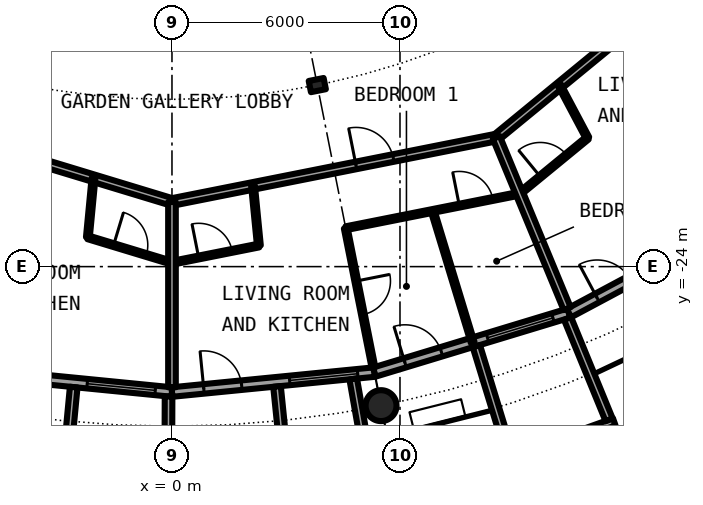
"""IFC4 building model, lengths in metres.
Left out: names, types, materials, properties, quantities, classifications, styles, units other than length and angle.
Written with IfcOpenShell. Run it as: python <this file> out.ifc"""

import sys

from ifc_helpers import new_model, si_unit, direction, frame, frame_2d, origin, origin_2d, place, context, subcontext, project, spatial, rectangle, circle, hollow_circle, i_section, extrude, element, fill, save


model = new_model("IFC4")
c1 = context("Model", 3, precision=1e-05, world=origin(), true_north=direction((0.0, 1.0)))
c2 = subcontext(c1, "Body", "Model", "MODEL_VIEW")
j1 = project(units=[si_unit("LENGTHUNIT", "METRE"), si_unit("PLANEANGLEUNIT", "RADIAN")], contexts=[c1])
p1 = place(None, origin())
s1 = spatial("IfcSite", under=j1, at=p1, CompositionType="ELEMENT")
p2 = place(p1, origin())
s2 = spatial("IfcBuilding", under=s1, at=p2, CompositionType="ELEMENT")
p3 = place(p2, frame((0.0, 0.0, 196.3)))
s3 = spatial("IfcBuildingStorey", under=s2, at=p3, CompositionType="ELEMENT", Elevation=196.3)
p4 = place(p3, frame((5.501, -27.658, 0.0), z_axis=(0.0, 0.0, 1.0), x_axis=(1.0, 0.0, 0.0)))
e1 = element("IfcColumn", 1, at=p4, inside=s3, PredefinedType="COLUMN", context=c2, shape_type="SweptSolid", body=[
    extrude(hollow_circle(Radius=0.406, WallThickness=0.03, at=origin_2d()), origin(), (0.0, 0.0, 1.0), 3.05),
])
p5 = place(p3, frame((3.824, -19.223, 0.0), z_axis=(0.0, 0.0, 1.0), x_axis=(0.195090322016, -0.980785280403, 0.0)))
e2 = element("IfcColumn", 2, at=p5, inside=s3, PredefinedType="COLUMN", context=c2, shape_type="SweptSolid", body=[
    extrude(i_section(OverallWidth=0.3, OverallDepth=0.4, WebThickness=0.013, FlangeThickness=0.024, FilletRadius=0.027, at=origin_2d()), origin(), (0.0, 0.0, 1.0), 3.05),
])
p6 = place(p3, frame((-5.326, -26.775, 0.0), z_axis=(0.0, 0.0, 1.0), x_axis=(0.995173996315, -0.098126026407, 0.0)))
e3 = element("IfcWall", 3, at=p6, inside=s3, PredefinedType="SOLIDWALL", context=c2, shape_type="SweptSolid", body=[
    extrude(rectangle(XDim=5.352, YDim=0.25, at=frame_2d((2.676, 0.0))), origin(), (0.0, 0.0, 1.0), 2.7),
])
p7 = place(p6, frame((0.841, 0.0, 0.0)))
e4 = element("IfcOpeningElement", 4, at=p7, cuts=e3, PredefinedType="OPENING", context=c2, shape_type="SweptSolid", body=[
    extrude(rectangle(XDim=1.0, YDim=2.2, at=frame_2d((0.5, 1.1))), frame((0.0, 0.135, 0.0), z_axis=(0.0, -1.0, 0.0), x_axis=(1.0, 0.0, 0.0)), (0.0, 0.0, 1.0), 0.27),
])
p8 = place(p6, frame((3.111, 0.0, 0.3)))
e5 = element("IfcOpeningElement", 5, at=p8, cuts=e3, PredefinedType="OPENING", context=c2, shape_type="SweptSolid", body=[
    extrude(rectangle(XDim=1.8, YDim=2.1, at=frame_2d((0.9, 1.05))), frame((0.0, 0.135, 0.0), z_axis=(0.0, -1.0, 0.0), x_axis=(1.0, 0.0, 0.0)), (0.0, 0.0, 1.0), 0.27),
])
p9 = place(p3, frame((-2.586, -27.171, -0.03), z_axis=(0.0, 0.0, 1.0), x_axis=(-0.094548432284, -0.995520262954, 0.0)))
e6 = element("IfcWall", 6, at=p9, inside=s3, PredefinedType="SOLIDWALL", context=c2, shape_type="SweptSolid", body=[
    extrude(rectangle(XDim=3.006, YDim=0.2, at=frame_2d((1.503, 0.0))), origin(), (0.0, 0.0, 1.0), 2.73),
])
p10 = place(p3, frame((-0.09, -27.417, -0.03), z_axis=(0.0, 0.0, 1.0), x_axis=(-0.00347308367, -0.999993968827, 0.0)))
e7 = element("IfcWall", 7, at=p10, inside=s3, PredefinedType="SOLIDWALL", context=c2, shape_type="SweptSolid", body=[
    extrude(rectangle(XDim=2.882, YDim=0.2, at=frame_2d((1.441, 0.0))), origin(), (0.0, 0.0, 1.0), 2.73),
])
p11 = place(p3, frame((0.0, -27.3, 0.0), z_axis=(0.0, 0.0, 1.0), x_axis=(0.995173996315, 0.098126026407, 0.0)))
e8 = element("IfcWall", 8, at=p11, inside=s3, PredefinedType="SOLIDWALL", context=c2, shape_type="SweptSolid", body=[
    extrude(rectangle(XDim=5.352, YDim=0.25, at=frame_2d((2.676, 0.0))), origin(), (0.0, 0.0, 1.0), 2.7),
])
p12 = place(p11, frame((0.841, 0.0, 0.0)))
e9 = element("IfcOpeningElement", 9, at=p12, cuts=e8, PredefinedType="OPENING", context=c2, shape_type="SweptSolid", body=[
    extrude(rectangle(XDim=1.0, YDim=2.2, at=frame_2d((0.5, 1.1))), frame((0.0, 0.135, 0.0), z_axis=(0.0, -1.0, 0.0), x_axis=(1.0, 0.0, 0.0)), (0.0, 0.0, 1.0), 0.27),
])
p13 = place(p11, frame((3.111, 0.0, 0.3)))
e10 = element("IfcOpeningElement", 10, at=p13, cuts=e8, PredefinedType="OPENING", context=c2, shape_type="SweptSolid", body=[
    extrude(rectangle(XDim=1.8, YDim=2.1, at=frame_2d((0.9, 1.05))), frame((0.0, 0.135, 0.0), z_axis=(0.0, -1.0, 0.0), x_axis=(1.0, 0.0, 0.0)), (0.0, 0.0, 1.0), 0.27),
])
p14 = place(p3, frame((2.764, -27.153, -0.03), z_axis=(0.0, 0.0, 1.0), x_axis=(0.101505487237, -0.994834979311, 0.0)))
e11 = element("IfcWall", 11, at=p14, inside=s3, PredefinedType="SOLIDWALL", context=c2, shape_type="SweptSolid", body=[
    extrude(rectangle(XDim=3.007, YDim=0.2, at=frame_2d((1.503, 0.0))), origin(), (0.0, 0.0, 1.0), 2.73),
])
p15 = place(p3, frame((4.769, -26.956, -0.03), z_axis=(0.0, 0.0, 1.0), x_axis=(0.174056778901, -0.984735618183, 0.0)))
e12 = element("IfcWall", 12, at=p15, inside=s3, PredefinedType="SOLIDWALL", context=c2, shape_type="SweptSolid", body=[
    extrude(rectangle(XDim=2.925, YDim=0.2, at=frame_2d((1.462, 0.0))), origin(), (0.0, 0.0, 1.0), 2.73),
])
p16 = place(p3, frame((5.326, -26.775, 0.0), z_axis=(0.0, 0.0, 1.0), x_axis=(0.956965678721, 0.290201119486, 0.0)))
e13 = element("IfcWall", 13, at=p16, inside=s3, PredefinedType="SOLIDWALL", context=c2, shape_type="SweptSolid", body=[
    extrude(rectangle(XDim=5.351, YDim=0.25, at=frame_2d((2.676, 0.0))), origin(), (0.0, 0.0, 1.0), 2.7),
])
p17 = place(p16, frame((0.841, 0.0, 0.0)))
e14 = element("IfcOpeningElement", 14, at=p17, cuts=e13, PredefinedType="OPENING", context=c2, shape_type="SweptSolid", body=[
    extrude(rectangle(XDim=1.0, YDim=2.2, at=frame_2d((0.5, 1.1))), frame((0.0, 0.135, 0.0), z_axis=(0.0, -1.0, 0.0), x_axis=(1.0, 0.0, 0.0)), (0.0, 0.0, 1.0), 0.27),
])
p18 = place(p16, frame((3.111, 0.0, 0.3)))
e15 = element("IfcOpeningElement", 15, at=p18, cuts=e13, PredefinedType="OPENING", context=c2, shape_type="SweptSolid", body=[
    extrude(rectangle(XDim=1.8, YDim=2.1, at=frame_2d((0.9, 1.05))), frame((0.0, 0.135, 0.0), z_axis=(0.0, -1.0, 0.0), x_axis=(1.0, 0.0, 0.0)), (0.0, 0.0, 1.0), 0.27),
])
p19 = place(p3, frame((8.82, -29.093, -0.03), z_axis=(0.0, 0.0, 1.0), x_axis=(0.941461077774, 0.337121697664, 0.0)))
e16 = element("IfcWall", 16, at=p19, inside=s3, PredefinedType="SOLIDWALL", context=c2, shape_type="SweptSolid", body=[
    extrude(rectangle(XDim=2.993, YDim=0.2, at=frame_2d((1.497, 0.0))), origin(), (0.0, 0.0, 1.0), 2.73),
])
p20 = place(p19, frame((0.457, 0.0, 0.33)))
e17 = element("IfcOpeningElement", 17, at=p20, cuts=e16, PredefinedType="OPENING", context=c2, shape_type="SweptSolid", body=[
    extrude(circle(Radius=1.04, at=frame_2d((1.04, 1.04))), frame((0.0, 0.11, 0.0), z_axis=(0.0, -1.0, 0.0), x_axis=(1.0, 0.0, 0.0)), (0.0, 0.0, 1.0), 0.22),
])
p21 = place(p3, frame((8.009, -26.092, -0.03), z_axis=(0.0, 0.0, 1.0), x_axis=(0.293406695073, -0.955987715029, 0.0)))
e18 = element("IfcWall", 18, at=p21, inside=s3, PredefinedType="SOLIDWALL", context=c2, shape_type="SweptSolid", body=[
    extrude(rectangle(XDim=3.006, YDim=0.2, at=frame_2d((1.503, 0.0))), origin(), (0.0, 0.0, 1.0), 2.73),
])
p22 = place(p3, frame((10.409, -25.364, -0.03), z_axis=(0.0, 0.0, 1.0), x_axis=(0.379509886562, -0.925187681501, 0.0)))
e19 = element("IfcWall", 19, at=p22, inside=s3, PredefinedType="SOLIDWALL", context=c2, shape_type="SweptSolid", body=[
    extrude(rectangle(XDim=2.883, YDim=0.2, at=frame_2d((1.441, 0.0))), origin(), (0.0, 0.0, 1.0), 2.73),
])
p23 = place(p3, frame((10.447, -25.222, 0.0), z_axis=(0.0, 0.0, 1.0), x_axis=(0.881915646801, 0.471407246368, 0.0)))
e20 = element("IfcWall", 20, at=p23, inside=s3, PredefinedType="SOLIDWALL", context=c2, shape_type="SweptSolid", body=[
    extrude(rectangle(XDim=5.352, YDim=0.25, at=frame_2d((2.676, 0.0))), origin(), (0.0, 0.0, 1.0), 2.7),
])
p24 = place(p23, frame((0.841, 0.0, 0.0)))
e21 = element("IfcOpeningElement", 21, at=p24, cuts=e20, PredefinedType="OPENING", context=c2, shape_type="SweptSolid", body=[
    extrude(rectangle(XDim=1.0, YDim=2.2, at=frame_2d((0.5, 1.1))), frame((0.0, 0.135, 0.0), z_axis=(0.0, -1.0, 0.0), x_axis=(1.0, 0.0, 0.0)), (0.0, 0.0, 1.0), 0.27),
])
p25 = place(p23, frame((3.111, 0.0, 0.3)))
e22 = element("IfcOpeningElement", 22, at=p25, cuts=e20, PredefinedType="OPENING", context=c2, shape_type="SweptSolid", body=[
    extrude(rectangle(XDim=1.8, YDim=2.1, at=frame_2d((0.9, 1.05))), frame((0.0, 0.135, 0.0), z_axis=(0.0, -1.0, 0.0), x_axis=(1.0, 0.0, 0.0)), (0.0, 0.0, 1.0), 0.27),
])
p26 = place(p3, frame((0.0, -23.9, 0.0), z_axis=(0.0, 0.0, 1.0), x_axis=(0.98079351414, 0.19504892366, 0.0)))
e23 = element("IfcWall", 23, at=p26, inside=s3, PredefinedType="PARTITIONING", context=c2, shape_type="SweptSolid", body=[
    extrude(rectangle(XDim=2.332, YDim=0.1, at=frame_2d((1.166, 0.0))), origin(), (0.0, 0.0, 1.0), 2.7),
])
p27 = place(p26, frame((0.716, 0.0, 0.0)))
e24 = element("IfcOpeningElement", 24, at=p27, cuts=e23, PredefinedType="OPENING", context=c2, shape_type="SweptSolid", body=[
    extrude(rectangle(XDim=0.9, YDim=2.3, at=frame_2d((0.45, 1.15))), frame((0.0, 0.06, 0.0), z_axis=(0.0, -1.0, 0.0), x_axis=(1.0, 0.0, 0.0)), (0.0, 0.0, 1.0), 0.12),
])
p28 = place(p3, frame((4.577, -22.989, 0.0), z_axis=(0.0, 0.0, 1.0), x_axis=(0.980813600024, 0.194947895622, 0.0)))
e25 = element("IfcWall", 25, at=p28, inside=s3, PredefinedType="PARTITIONING", context=c2, shape_type="SweptSolid", body=[
    extrude(rectangle(XDim=4.662, YDim=0.1, at=frame_2d((2.331, 0.0))), origin(), (0.0, 0.0, 1.0), 2.7),
])
p29 = place(p28, frame((3.043, 0.0, 0.0)))
e26 = element("IfcOpeningElement", 26, at=p29, cuts=e25, PredefinedType="OPENING", context=c2, shape_type="SweptSolid", body=[
    extrude(rectangle(XDim=0.9, YDim=2.3, at=frame_2d((0.45, 1.15))), frame((0.0, 0.06, 0.0), z_axis=(0.0, -1.0, 0.0), x_axis=(1.0, 0.0, 0.0)), (0.0, 0.0, 1.0), 0.12),
])
p30 = place(p3, frame((-2.213, -23.229, 0.0), z_axis=(0.0, 0.0, 1.0), x_axis=(0.957056340114, -0.289901986622, 0.0)))
e27 = element("IfcWall", 27, at=p30, inside=s3, PredefinedType="PARTITIONING", context=c2, shape_type="SweptSolid", body=[
    extrude(rectangle(XDim=2.314, YDim=0.1, at=frame_2d((1.157, 0.0))), origin(), (0.0, 0.0, 1.0), 2.7),
])
p31 = place(p30, frame((0.707, 0.0, 0.0)))
e28 = element("IfcOpeningElement", 28, at=p31, cuts=e27, PredefinedType="OPENING", context=c2, shape_type="SweptSolid", body=[
    extrude(rectangle(XDim=0.9, YDim=2.3, at=frame_2d((0.45, 1.15))), frame((0.0, 0.06, 0.0), z_axis=(0.0, -1.0, 0.0), x_axis=(1.0, 0.0, 0.0)), (0.0, 0.0, 1.0), 0.12),
])
p32 = place(p3, frame((9.146, -22.081, 0.0), z_axis=(0.0, 0.0, 1.0), x_axis=(0.773095932958, 0.634289112663, 0.0)))
e29 = element("IfcWall", 29, at=p32, inside=s3, PredefinedType="PARTITIONING", context=c2, shape_type="SweptSolid", body=[
    extrude(rectangle(XDim=2.313, YDim=0.1, at=frame_2d((1.156, 0.0))), origin(), (0.0, 0.0, 1.0), 2.7),
])
p33 = place(p32, frame((0.706, 0.0, 0.0)))
e30 = element("IfcOpeningElement", 30, at=p33, cuts=e29, PredefinedType="OPENING", context=c2, shape_type="SweptSolid", body=[
    extrude(rectangle(XDim=0.9, YDim=2.3, at=frame_2d((0.45, 1.15))), frame((0.0, 0.06, 0.0), z_axis=(0.0, -1.0, 0.0), x_axis=(1.0, 0.0, 0.0)), (0.0, 0.0, 1.0), 0.12),
])
p34 = place(p3, frame((0.0, -22.3, 0.0), z_axis=(0.0, 0.0, 1.0), x_axis=(0.980813117615, 0.194950322682, 0.0)))
e31 = element("IfcWall", 31, at=p34, inside=s3, PredefinedType="PARTITIONING", context=c2, shape_type="SweptSolid", body=[
    extrude(rectangle(XDim=8.7, YDim=0.2, at=frame_2d((4.35, 0.0))), origin(), (0.0, 0.0, 1.0), 2.7),
])
p35 = place(p34, frame((4.938, 0.0, 0.0)))
e32 = element("IfcOpeningElement", 32, at=p35, cuts=e31, PredefinedType="OPENING", context=c2, shape_type="SweptSolid", body=[
    extrude(rectangle(XDim=1.0, YDim=2.3, at=frame_2d((0.5, 1.15))), frame((0.0, 0.11, 0.0), z_axis=(0.0, -1.0, 0.0), x_axis=(1.0, 0.0, 0.0)), (0.0, 0.0, 1.0), 0.22),
])
p36 = place(p3, frame((-12.389, -18.542, 0.0), z_axis=(0.0, 0.0, 1.0), x_axis=(0.956942051091, -0.290279022415, 0.0)))
e33 = element("IfcWall", 33, at=p36, inside=s3, PredefinedType="PARTITIONING", context=c2, shape_type="SweptSolid", body=[
    extrude(rectangle(XDim=12.946, YDim=0.2, at=frame_2d((6.473, 0.0))), origin(), (0.0, 0.0, 1.0), 2.7),
])
p37 = place(p36, frame((4.895, 0.0, 0.0)))
e34 = element("IfcOpeningElement", 34, at=p37, cuts=e33, PredefinedType="OPENING", context=c2, shape_type="SweptSolid", body=[
    extrude(rectangle(XDim=1.0, YDim=2.3, at=frame_2d((0.5, 1.15))), frame((0.0, 0.11, 0.0), z_axis=(0.0, -1.0, 0.0), x_axis=(1.0, 0.0, 0.0)), (0.0, 0.0, 1.0), 0.22),
])
p38 = place(p3, frame((8.534, -20.603, 0.0), z_axis=(0.0, 0.0, 1.0), x_axis=(0.772983503654, 0.634426121056, 0.0)))
e35 = element("IfcWall", 35, at=p38, inside=s3, PredefinedType="PARTITIONING", context=c2, shape_type="SweptSolid", body=[
    extrude(rectangle(XDim=12.947, YDim=0.2, at=frame_2d((6.474, 0.0))), origin(), (0.0, 0.0, 1.0), 2.7),
])
p39 = place(p38, frame((7.053, 0.0, 0.0)))
e36 = element("IfcOpeningElement", 36, at=p39, cuts=e35, PredefinedType="OPENING", context=c2, shape_type="SweptSolid", body=[
    extrude(rectangle(XDim=1.0, YDim=2.3, at=frame_2d((0.5, 1.15))), frame((0.0, 0.11, 0.0), z_axis=(0.0, -1.0, 0.0), x_axis=(1.0, 0.0, 0.0)), (0.0, 0.0, 1.0), 0.22),
])
p40 = place(p3, frame((2.133, -21.876, 0.0), z_axis=(0.0, 0.0, 1.0), x_axis=(0.097709761212, -0.995214952944, 0.0)))
e37 = element("IfcWall", 37, at=p40, inside=s3, PredefinedType="PARTITIONING", context=c2, shape_type="SweptSolid", body=[
    extrude(rectangle(XDim=1.577, YDim=0.1, at=frame_2d((0.788, 0.0))), origin(), (0.0, 0.0, 1.0), 2.7),
])
p41 = place(p3, frame((-2.213, -23.229, 0.0), z_axis=(0.0, 0.0, 1.0), x_axis=(0.094720578196, 0.995503898569, 0.0)))
e38 = element("IfcWall", 38, at=p41, inside=s3, PredefinedType="PARTITIONING", context=c2, shape_type="SweptSolid", body=[
    extrude(rectangle(XDim=1.562, YDim=0.1, at=frame_2d((0.781, 0.0))), origin(), (0.0, 0.0, 1.0), 2.7),
])
p42 = place(p3, frame((0.0, -27.175, 0.0), z_axis=(0.0, 0.0, 1.0), x_axis=(0.0, 1.0, 0.0)))
e39 = element("IfcWall", 39, at=p42, inside=s3, PredefinedType="PARTITIONING", context=c2, shape_type="SweptSolid", body=[
    extrude(rectangle(XDim=4.875, YDim=0.2, at=frame_2d((2.438, 0.0))), origin(), (0.0, 0.0, 1.0), 2.7),
])
p43 = place(p3, frame((4.573, -22.99, 0.0), z_axis=(0.0, 0.0, 1.0), x_axis=(0.19518582438, -0.980766278968, 0.0)))
e40 = element("IfcWall", 40, at=p43, inside=s3, PredefinedType="PARTITIONING", context=c2, shape_type="SweptSolid", body=[
    extrude(rectangle(XDim=3.735, YDim=0.1, at=frame_2d((1.867, 0.0))), origin(), (0.0, 0.0, 1.0), 2.7),
])
p44 = place(p43, frame((1.417, 0.0, 0.0)))
e41 = element("IfcOpeningElement", 41, at=p44, cuts=e40, PredefinedType="OPENING", context=c2, shape_type="SweptSolid", body=[
    extrude(rectangle(XDim=0.9, YDim=2.3, at=frame_2d((0.45, 1.15))), frame((0.0, 0.06, 0.0), z_axis=(0.0, -1.0, 0.0), x_axis=(1.0, 0.0, 0.0)), (0.0, 0.0, 1.0), 0.12),
])
p45 = place(p3, frame((6.86, -22.536, 0.0), z_axis=(0.0, 0.0, 1.0), x_axis=(0.291054201552, -0.956706565128, 0.0)))
e42 = element("IfcWall", 42, at=p45, inside=s3, PredefinedType="PARTITIONING", context=c2, shape_type="SweptSolid", body=[
    extrude(rectangle(XDim=3.618, YDim=0.1, at=frame_2d((1.809, 0.0))), origin(), (0.0, 0.0, 1.0), 2.7),
])
p46 = place(p3, frame((8.534, -20.603, 0.0), z_axis=(0.0, 0.0, 1.0), x_axis=(0.382651153718, -0.923892902104, 0.0)))
e43 = element("IfcWall", 43, at=p46, inside=s3, PredefinedType="PARTITIONING", context=c2, shape_type="SweptSolid", body=[
    extrude(rectangle(XDim=4.874, YDim=0.2, at=frame_2d((2.437, 0.0))), origin(), (0.0, 0.0, 1.0), 2.7),
])
p47 = place(p3, frame((10.202, -19.234, 0.0), z_axis=(0.0, 0.0, 1.0), x_axis=(0.468648615763, -0.88338466986, 0.0)))
e44 = element("IfcWall", 44, at=p47, inside=s3, PredefinedType="PARTITIONING", context=c2, shape_type="SweptSolid", body=[
    extrude(rectangle(XDim=1.562, YDim=0.1, at=frame_2d((0.781, 0.0))), origin(), (0.0, 0.0, 1.0), 2.7),
])
p48 = place(p8, origin())
e45 = element("IfcWindow", 45, at=p48, inside=s3, PartitioningType="SINGLE_PANEL", PredefinedType="WINDOW", context=c2, shape_type="SweptSolid", body=[
    extrude(rectangle(XDim=1.8, YDim=2.1, at=frame_2d((0.9, 1.05))), frame((0.0, 0.03, 0.0), z_axis=(0.0, -1.0, 0.0), x_axis=(1.0, 0.0, 0.0)), (0.0, 0.0, 1.0), 0.06),
])
fill(e5, e45)
p49 = place(p12, origin())
e46 = element("IfcDoor", 46, at=p49, inside=s3, OperationType="SINGLE_SWING_LEFT", PredefinedType="DOOR", context=c2, shape_type="SweptSolid", body=[
    extrude(rectangle(XDim=1.0, YDim=2.2, at=frame_2d((0.5, 1.1))), frame((0.0, 0.025, 0.0), z_axis=(0.0, -1.0, 0.0), x_axis=(1.0, 0.0, 0.0)), (0.0, 0.0, 1.0), 0.05),
])
fill(e9, e46)
p50 = place(p13, origin())
e47 = element("IfcWindow", 47, at=p50, inside=s3, PartitioningType="SINGLE_PANEL", PredefinedType="WINDOW", context=c2, shape_type="SweptSolid", body=[
    extrude(rectangle(XDim=1.8, YDim=2.1, at=frame_2d((0.9, 1.05))), frame((0.0, 0.03, 0.0), z_axis=(0.0, -1.0, 0.0), x_axis=(1.0, 0.0, 0.0)), (0.0, 0.0, 1.0), 0.06),
])
fill(e10, e47)
p51 = place(p17, origin())
e48 = element("IfcDoor", 48, at=p51, inside=s3, OperationType="SINGLE_SWING_LEFT", PredefinedType="DOOR", context=c2, shape_type="SweptSolid", body=[
    extrude(rectangle(XDim=1.0, YDim=2.2, at=frame_2d((0.5, 1.1))), frame((0.0, 0.025, 0.0), z_axis=(0.0, -1.0, 0.0), x_axis=(1.0, 0.0, 0.0)), (0.0, 0.0, 1.0), 0.05),
])
fill(e14, e48)
p52 = place(p18, origin())
e49 = element("IfcWindow", 49, at=p52, inside=s3, PartitioningType="SINGLE_PANEL", PredefinedType="WINDOW", context=c2, shape_type="SweptSolid", body=[
    extrude(rectangle(XDim=1.8, YDim=2.1, at=frame_2d((0.9, 1.05))), frame((0.0, 0.03, 0.0), z_axis=(0.0, -1.0, 0.0), x_axis=(1.0, 0.0, 0.0)), (0.0, 0.0, 1.0), 0.06),
])
fill(e15, e49)
p53 = place(p24, origin())
e50 = element("IfcDoor", 50, at=p53, inside=s3, OperationType="SINGLE_SWING_LEFT", PredefinedType="DOOR", context=c2, shape_type="SweptSolid", body=[
    extrude(rectangle(XDim=1.0, YDim=2.2, at=frame_2d((0.5, 1.1))), frame((0.0, 0.025, 0.0), z_axis=(0.0, -1.0, 0.0), x_axis=(1.0, 0.0, 0.0)), (0.0, 0.0, 1.0), 0.05),
])
fill(e21, e50)
p54 = place(p31, origin())
e51 = element("IfcDoor", 51, at=p54, inside=s3, OperationType="SINGLE_SWING_LEFT", PredefinedType="DOOR", context=c2, shape_type="SweptSolid", body=[
    extrude(rectangle(XDim=0.9, YDim=2.3, at=frame_2d((0.45, 1.15))), frame((0.0, 0.025, 0.0), z_axis=(0.0, -1.0, 0.0), x_axis=(1.0, 0.0, 0.0)), (0.0, 0.0, 1.0), 0.05),
])
fill(e28, e51)
p55 = place(p35, origin())
e52 = element("IfcDoor", 52, at=p55, inside=s3, OperationType="SINGLE_SWING_RIGHT", PredefinedType="DOOR", context=c2, shape_type="SweptSolid", body=[
    extrude(rectangle(XDim=1.0, YDim=2.3, at=frame_2d((0.5, 1.15))), frame((0.0, 0.025, 0.0), z_axis=(0.0, -1.0, 0.0), x_axis=(1.0, 0.0, 0.0)), (0.0, 0.0, 1.0), 0.05),
])
fill(e32, e52)
p56 = place(p27, origin())
e53 = element("IfcDoor", 53, at=p56, inside=s3, OperationType="SINGLE_SWING_LEFT", PredefinedType="DOOR", context=c2, shape_type="SweptSolid", body=[
    extrude(rectangle(XDim=0.9, YDim=2.3, at=frame_2d((0.45, 1.15))), frame((0.0, 0.025, 0.0), z_axis=(0.0, -1.0, 0.0), x_axis=(1.0, 0.0, 0.0)), (0.0, 0.0, 1.0), 0.05),
])
fill(e24, e53)
p57 = place(p44, origin())
e54 = element("IfcDoor", 54, at=p57, inside=s3, OperationType="SINGLE_SWING_LEFT", PredefinedType="DOOR", context=c2, shape_type="SweptSolid", body=[
    extrude(rectangle(XDim=0.9, YDim=2.3, at=frame_2d((0.45, 1.15))), frame((0.0, 0.025, 0.0), z_axis=(0.0, -1.0, 0.0), x_axis=(1.0, 0.0, 0.0)), (0.0, 0.0, 1.0), 0.05),
])
fill(e41, e54)
p58 = place(p29, origin())
e55 = element("IfcDoor", 55, at=p58, inside=s3, OperationType="SINGLE_SWING_RIGHT", PredefinedType="DOOR", context=c2, shape_type="SweptSolid", body=[
    extrude(rectangle(XDim=0.9, YDim=2.3, at=frame_2d((0.45, 1.15))), frame((0.0, 0.025, 0.0), z_axis=(0.0, -1.0, 0.0), x_axis=(1.0, 0.0, 0.0)), (0.0, 0.0, 1.0), 0.05),
])
fill(e26, e55)
p59 = place(p33, origin())
e56 = element("IfcDoor", 56, at=p59, inside=s3, OperationType="SINGLE_SWING_LEFT", PredefinedType="DOOR", context=c2, shape_type="SweptSolid", body=[
    extrude(rectangle(XDim=0.9, YDim=2.3, at=frame_2d((0.45, 1.15))), frame((0.0, 0.025, 0.0), z_axis=(0.0, -1.0, 0.0), x_axis=(1.0, 0.0, 0.0)), (0.0, 0.0, 1.0), 0.05),
])
fill(e30, e56)
save(model, sys.argv[1])
